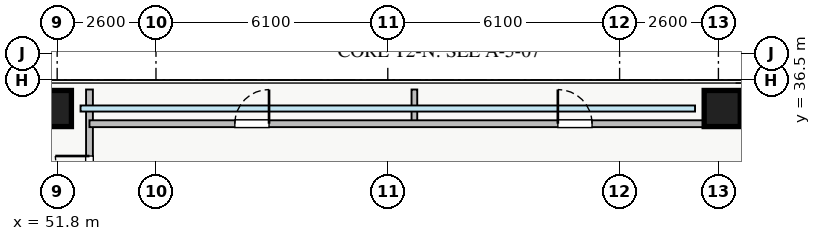
"""IFC4 building model, lengths in metres.
Left out: names, types, materials, properties, quantities, classifications, styles, units other than length and angle.
Written with IfcOpenShell. Run it as: python <this file> out.ifc"""

import sys

from ifc_helpers import new_model, si_unit, direction, frame, frame_2d, origin, origin_2d, place, context, subcontext, project, spatial, rectangle, extrude, source, transform, mapped, element, fill, save


model = new_model("IFC4")
c1 = context("Model", 3, precision=1e-05, world=origin(), true_north=direction((0.0, 1.0)))
c2 = subcontext(c1, "Body", "Model", "MODEL_VIEW")
j1 = project(units=[si_unit("LENGTHUNIT", "METRE"), si_unit("PLANEANGLEUNIT", "RADIAN")], contexts=[c1])
p1 = place(None, origin())
s1 = spatial("IfcSite", under=j1, at=p1, CompositionType="ELEMENT")
p2 = place(p1, origin())
s2 = spatial("IfcBuilding", under=s1, at=p2, CompositionType="ELEMENT")
p3 = place(p2, frame((0.0, 0.0, 56.75)))
s3 = spatial("IfcBuildingStorey", under=s2, at=p3, CompositionType="ELEMENT", Elevation=56.75)
m1 = source(origin(), c2, "Body", "SweptSolid", [
    extrude(rectangle(XDim=0.95, YDim=0.95, at=origin_2d()), origin(), (0.0, 0.0, 1.0), 3.25),
])
for number, where, z_axis, x_axis in (
    (1, (69.3, 35.75, 0.0), (0.0, 0.0, 1.0), (1.0, 0.0, 0.0)),
    (2, (51.7, 35.75, 0.0), (0.0, 0.0, 1.0), (1.0, 0.0, 0.0)),
):
    element("IfcColumn", number, at=place(p3, frame(where, z_axis=z_axis, x_axis=x_axis)), inside=s3, PredefinedType="COLUMN", context=c2, shape_type="MappedRepresentation", body=[
        mapped(m1, transform((0.0, 0.0, 0.0), x_axis=(1.0, 0.0, 0.0), y_axis=(0.0, 1.0, 0.0), z_axis=(0.0, 0.0, 1.0), scale=1.0)),
    ])
p4 = place(p3, frame((52.65, 9.75, 0.0), z_axis=(0.0, 0.0, 1.0), x_axis=(0.0, 1.0, 0.0)))
e3 = element("IfcWall", 3, at=p4, inside=s3, PredefinedType="PARTITIONING", context=c2, shape_type="SweptSolid", body=[
    extrude(rectangle(XDim=26.5, YDim=0.18, at=frame_2d((13.25, 0.0))), origin(), (0.0, 0.0, 1.0), 3.07),
])
p5 = place(p4, frame((23.85, 0.0, 0.0)))
e4 = element("IfcOpeningElement", 4, at=p5, cuts=e3, PredefinedType="OPENING", context=c2, shape_type="SweptSolid", body=[
    extrude(rectangle(XDim=0.9, YDim=2.05, at=frame_2d((0.45, 1.025))), frame((0.0, 0.1, 0.0), z_axis=(0.0, -1.0, 0.0), x_axis=(1.0, 0.0, 0.0)), (0.0, 0.0, 1.0), 0.2),
])
p6 = place(p4, frame((1.75, 0.0, 0.0)))
e5 = element("IfcOpeningElement", 5, at=p6, cuts=e3, PredefinedType="OPENING", context=c2, shape_type="SweptSolid", body=[
    extrude(rectangle(XDim=0.9, YDim=2.05, at=frame_2d((0.45, 1.025))), frame((0.0, 0.1, 0.0), z_axis=(0.0, -1.0, 0.0), x_axis=(1.0, 0.0, 0.0)), (0.0, 0.0, 1.0), 0.2),
])
p7 = place(p4, frame((5.145, 0.0, 0.0)))
e6 = element("IfcOpeningElement", 6, at=p7, cuts=e3, PredefinedType="OPENING", context=c2, shape_type="SweptSolid", body=[
    extrude(rectangle(XDim=1.0, YDim=2.05, at=frame_2d((0.5, 1.025))), frame((0.0, 0.1, 0.0), z_axis=(0.0, -1.0, 0.0), x_axis=(1.0, 0.0, 0.0)), (0.0, 0.0, 1.0), 0.2),
])
p8 = place(p4, frame((14.39, 0.0, 0.0)))
e7 = element("IfcOpeningElement", 7, at=p8, cuts=e3, PredefinedType="OPENING", context=c2, shape_type="SweptSolid", body=[
    extrude(rectangle(XDim=1.0, YDim=2.05, at=frame_2d((0.5, 1.025))), frame((0.0, 0.1, 0.0), z_axis=(0.0, -1.0, 0.0), x_axis=(1.0, 0.0, 0.0)), (0.0, 0.0, 1.0), 0.2),
])
for number, where, z_axis, x_axis in (
    (8, (61.2, 35.35, 0.0), (0.0, 0.0, 1.0), (0.0, 1.0, 0.0)),
    (9, (69.65, 35.35, 0.0), (0.0, 0.0, 1.0), (0.0, 1.0, 0.0)),
):
    element("IfcWall", number, at=place(p3, frame(where, z_axis=z_axis, x_axis=x_axis)), inside=s3, PredefinedType="PARTITIONING", context=c2, shape_type="SweptSolid", body=[
        extrude(rectangle(XDim=0.9, YDim=0.15, at=frame_2d((0.45, 0.0))), origin(), (0.0, 0.0, 1.0), 3.07),
    ])
p9 = place(p3, frame((52.65, 35.35, 0.0), z_axis=(0.0, 0.0, 1.0), x_axis=(1.0, 0.0, 0.0)))
e10 = element("IfcWall", 10, at=p9, inside=s3, PredefinedType="PARTITIONING", context=c2, shape_type="SweptSolid", body=[
    extrude(rectangle(XDim=17.0, YDim=0.18, at=frame_2d((8.5, 0.0))), origin(), (0.0, 0.0, 1.0), 3.07),
])
p10 = place(p9, frame((3.825, 0.0, 0.0)))
e11 = element("IfcOpeningElement", 11, at=p10, cuts=e10, PredefinedType="OPENING", context=c2, shape_type="SweptSolid", body=[
    extrude(rectangle(XDim=0.9, YDim=2.05, at=frame_2d((0.45, 1.025))), frame((0.0, 0.1, 0.0), z_axis=(0.0, -1.0, 0.0), x_axis=(1.0, 0.0, 0.0)), (0.0, 0.0, 1.0), 0.2),
])
p11 = place(p9, frame((12.325, 0.0, 0.0)))
e12 = element("IfcOpeningElement", 12, at=p11, cuts=e10, PredefinedType="OPENING", context=c2, shape_type="SweptSolid", body=[
    extrude(rectangle(XDim=0.9, YDim=2.05, at=frame_2d((0.45, 1.025))), frame((0.0, 0.1, 0.0), z_axis=(0.0, -1.0, 0.0), x_axis=(1.0, 0.0, 0.0)), (0.0, 0.0, 1.0), 0.2),
])
m2 = source(origin(), c2, "Body", "SweptSolid", [
    extrude(rectangle(XDim=0.9, YDim=2.05, at=frame_2d((0.45, 1.025))), frame((0.0, 0.025, 0.0), z_axis=(0.0, -1.0, 0.0), x_axis=(1.0, 0.0, 0.0)), (0.0, 0.0, 1.0), 0.05),
])
p12 = place(p5, origin())
e13 = element("IfcDoor", 13, at=p12, inside=s3, OperationType="SINGLE_SWING_RIGHT", PredefinedType="DOOR", context=c2, shape_type="MappedRepresentation", body=[
    mapped(m2, transform((0.0, 0.0, 0.0), x_axis=(1.0, 0.0, 0.0), y_axis=(0.0, 1.0, 0.0), z_axis=(0.0, 0.0, 1.0), scale=1.0)),
])
fill(e4, e13)
p13 = place(p10, origin())
e14 = element("IfcDoor", 14, at=p13, inside=s3, OperationType="SINGLE_SWING_RIGHT", PredefinedType="DOOR", context=c2, shape_type="MappedRepresentation", body=[
    mapped(m2, transform((0.0, 0.0, 0.0), x_axis=(1.0, 0.0, 0.0), y_axis=(0.0, 1.0, 0.0), z_axis=(0.0, 0.0, 1.0), scale=1.0)),
])
fill(e11, e14)
p14 = place(p11, origin())
e15 = element("IfcDoor", 15, at=p14, inside=s3, OperationType="SINGLE_SWING_LEFT", PredefinedType="DOOR", context=c2, shape_type="MappedRepresentation", body=[
    mapped(m2, transform((0.0, 0.0, 0.0), x_axis=(1.0, 0.0, 0.0), y_axis=(0.0, 1.0, 0.0), z_axis=(0.0, 0.0, 1.0), scale=1.0)),
])
fill(e12, e15)
save(model, sys.argv[1])
